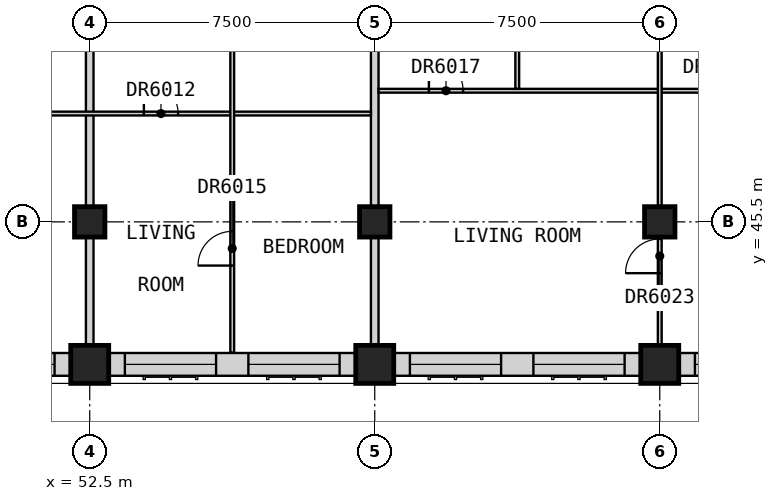
"""IFC4 building model, lengths in metres.
Left out: names, types, materials, properties, quantities, classifications, styles, units other than length and angle.
Written with IfcOpenShell. Run it as: python <this file> out.ifc"""

import sys

from ifc_helpers import new_model, si_unit, direction, frame, frame_2d, origin, origin_2d, place, context, subcontext, project, spatial, rectangle, extrude, element, fill, save


model = new_model("IFC4")
c1 = context("Model", 3, precision=1e-05, world=origin(), true_north=direction((0.0, 1.0)))
c2 = subcontext(c1, "Body", "Model", "MODEL_VIEW")
j1 = project(units=[si_unit("LENGTHUNIT", "METRE"), si_unit("PLANEANGLEUNIT", "RADIAN")], contexts=[c1])
p1 = place(None, origin())
s1 = spatial("IfcSite", under=j1, at=p1, CompositionType="ELEMENT")
p2 = place(p1, origin())
s2 = spatial("IfcBuilding", under=s1, at=p2, CompositionType="ELEMENT")
p3 = place(p2, frame((0.0, 0.0, 254.7)))
s3 = spatial("IfcBuildingStorey", under=s2, at=p3, CompositionType="ELEMENT", Elevation=254.7)
for number, where, z_axis, x_axis in (
    (1, (52.5, 41.75, 0.0), (0.0, 0.0, 1.0), (1.0, 0.0, 0.0)),
    (2, (60.0, 41.75, 0.0), (0.0, 0.0, 1.0), (1.0, 0.0, 0.0)),
    (3, (67.5, 41.75, 0.0), (0.0, 0.0, 1.0), (1.0, 0.0, 0.0)),
):
    element("IfcColumn", number, at=place(p3, frame(where, z_axis=z_axis, x_axis=x_axis)), inside=s3, PredefinedType="COLUMN", context=c2, shape_type="SweptSolid", body=[
        extrude(rectangle(XDim=1.0, YDim=1.0, at=origin_2d()), origin(), (0.0, 0.0, 1.0), 3.5),
    ])
for number, where, z_axis, x_axis in (
    (4, (52.5, 45.5, 0.0), (0.0, 0.0, 1.0), (1.0, 0.0, 0.0)),
    (5, (60.0, 45.5, 0.0), (0.0, 0.0, 1.0), (1.0, 0.0, 0.0)),
    (6, (67.5, 45.5, 0.0), (0.0, 0.0, 1.0), (1.0, 0.0, 0.0)),
):
    element("IfcColumn", number, at=place(p3, frame(where, z_axis=z_axis, x_axis=x_axis)), inside=s3, PredefinedType="COLUMN", context=c2, shape_type="SweptSolid", body=[
        extrude(rectangle(XDim=0.8, YDim=0.8, at=origin_2d()), origin(), (0.0, 0.0, 1.0), 3.5),
    ])
p4 = place(p3, frame((45.5, 41.75, 0.0), z_axis=(0.0, 0.0, 1.0), x_axis=(1.0, 0.0, 0.0)))
e7 = element("IfcWall", 7, at=p4, inside=s3, PredefinedType="SOLIDWALL", context=c2, shape_type="SweptSolid", body=[
    extrude(rectangle(XDim=6.5, YDim=0.6, at=frame_2d((3.25, 0.0))), origin(), (0.0, 0.0, 1.0), 2.75),
])
p5 = place(p4, frame((0.425, 0.0, 0.8)))
e8 = element("IfcOpeningElement", 8, at=p5, cuts=e7, PredefinedType="OPENING", context=c2, shape_type="SweptSolid", body=[
    extrude(rectangle(XDim=2.4, YDim=1.8, at=frame_2d((1.2, 0.9))), frame((0.0, 0.31, 0.0), z_axis=(0.0, -1.0, 0.0), x_axis=(1.0, 0.0, 0.0)), (0.0, 0.0, 1.0), 0.62),
])
p6 = place(p4, frame((3.675, 0.0, 0.8)))
e9 = element("IfcOpeningElement", 9, at=p6, cuts=e7, PredefinedType="OPENING", context=c2, shape_type="SweptSolid", body=[
    extrude(rectangle(XDim=2.4, YDim=1.8, at=frame_2d((1.2, 0.9))), frame((0.0, 0.31, 0.0), z_axis=(0.0, -1.0, 0.0), x_axis=(1.0, 0.0, 0.0)), (0.0, 0.0, 1.0), 0.62),
])
p7 = place(p3, frame((53.0, 41.75, 0.0), z_axis=(0.0, 0.0, 1.0), x_axis=(1.0, 0.0, 0.0)))
e10 = element("IfcWall", 10, at=p7, inside=s3, PredefinedType="SOLIDWALL", context=c2, shape_type="SweptSolid", body=[
    extrude(rectangle(XDim=6.5, YDim=0.6, at=frame_2d((3.25, 0.0))), origin(), (0.0, 0.0, 1.0), 2.75),
])
p8 = place(p7, frame((0.425, 0.0, 0.8)))
e11 = element("IfcOpeningElement", 11, at=p8, cuts=e10, PredefinedType="OPENING", context=c2, shape_type="SweptSolid", body=[
    extrude(rectangle(XDim=2.4, YDim=1.8, at=frame_2d((1.2, 0.9))), frame((0.0, 0.31, 0.0), z_axis=(0.0, -1.0, 0.0), x_axis=(1.0, 0.0, 0.0)), (0.0, 0.0, 1.0), 0.62),
])
p9 = place(p7, frame((3.675, 0.0, 0.8)))
e12 = element("IfcOpeningElement", 12, at=p9, cuts=e10, PredefinedType="OPENING", context=c2, shape_type="SweptSolid", body=[
    extrude(rectangle(XDim=2.4, YDim=1.8, at=frame_2d((1.2, 0.9))), frame((0.0, 0.31, 0.0), z_axis=(0.0, -1.0, 0.0), x_axis=(1.0, 0.0, 0.0)), (0.0, 0.0, 1.0), 0.62),
])
p10 = place(p3, frame((60.5, 41.75, 0.0), z_axis=(0.0, 0.0, 1.0), x_axis=(1.0, 0.0, 0.0)))
e13 = element("IfcWall", 13, at=p10, inside=s3, PredefinedType="SOLIDWALL", context=c2, shape_type="SweptSolid", body=[
    extrude(rectangle(XDim=6.5, YDim=0.6, at=frame_2d((3.25, 0.0))), origin(), (0.0, 0.0, 1.0), 2.75),
])
p11 = place(p10, frame((0.425, 0.0, 0.8)))
e14 = element("IfcOpeningElement", 14, at=p11, cuts=e13, PredefinedType="OPENING", context=c2, shape_type="SweptSolid", body=[
    extrude(rectangle(XDim=2.4, YDim=1.8, at=frame_2d((1.2, 0.9))), frame((0.0, 0.31, 0.0), z_axis=(0.0, -1.0, 0.0), x_axis=(1.0, 0.0, 0.0)), (0.0, 0.0, 1.0), 0.62),
])
p12 = place(p10, frame((3.675, 0.0, 0.8)))
e15 = element("IfcOpeningElement", 15, at=p12, cuts=e13, PredefinedType="OPENING", context=c2, shape_type="SweptSolid", body=[
    extrude(rectangle(XDim=2.4, YDim=1.8, at=frame_2d((1.2, 0.9))), frame((0.0, 0.31, 0.0), z_axis=(0.0, -1.0, 0.0), x_axis=(1.0, 0.0, 0.0)), (0.0, 0.0, 1.0), 0.62),
])
p13 = place(p3, frame((68.0, 41.75, 0.0), z_axis=(0.0, 0.0, 1.0), x_axis=(1.0, 0.0, 0.0)))
e16 = element("IfcWall", 16, at=p13, inside=s3, PredefinedType="SOLIDWALL", context=c2, shape_type="SweptSolid", body=[
    extrude(rectangle(XDim=5.75, YDim=0.6, at=frame_2d((2.875, 0.0))), origin(), (0.0, 0.0, 1.0), 3.1),
])
p14 = place(p13, frame((0.425, 0.0, 0.8)))
e17 = element("IfcOpeningElement", 17, at=p14, cuts=e16, PredefinedType="OPENING", context=c2, shape_type="SweptSolid", body=[
    extrude(rectangle(XDim=2.4, YDim=1.8, at=frame_2d((1.2, 0.9))), frame((0.0, 0.31, 0.0), z_axis=(0.0, -1.0, 0.0), x_axis=(1.0, 0.0, 0.0)), (0.0, 0.0, 1.0), 0.62),
])
for number, where, z_axis, x_axis in (
    (18, (52.5, 41.25, 0.0), (0.0, 0.0, 1.0), (0.0, 1.0, 0.0)),
    (19, (60.0, 41.25, 0.0), (0.0, 0.0, 1.0), (0.0, 1.0, 0.0)),
):
    element("IfcWall", number, at=place(p3, frame(where, z_axis=z_axis, x_axis=x_axis)), inside=s3, PredefinedType="PARTITIONING", context=c2, shape_type="SweptSolid", body=[
        extrude(rectangle(XDim=16.875, YDim=0.2, at=frame_2d((8.438, 0.0))), origin(), (0.0, 0.0, 1.0), 3.1),
    ])
p15 = place(p3, frame((37.6, 48.35, 0.0), z_axis=(0.0, 0.0, 1.0), x_axis=(1.0, 0.0, 0.0)))
e20 = element("IfcWall", 20, at=p15, inside=s3, PredefinedType="PARTITIONING", context=c2, shape_type="SweptSolid", body=[
    extrude(rectangle(XDim=22.3, YDim=0.1, at=frame_2d((11.15, 0.0))), origin(), (0.0, 0.0, 1.0), 3.1),
])
p16 = place(p15, frame((1.325, 0.0, 0.0)))
e21 = element("IfcOpeningElement", 21, at=p16, cuts=e20, PredefinedType="OPENING", context=c2, shape_type="SweptSolid", body=[
    extrude(rectangle(XDim=0.9, YDim=2.1, at=frame_2d((0.45, 1.05))), frame((0.0, 0.06, 0.0), z_axis=(0.0, -1.0, 0.0), x_axis=(1.0, 0.0, 0.0)), (0.0, 0.0, 1.0), 0.12),
])
p17 = place(p15, frame((8.825, 0.0, 0.0)))
e22 = element("IfcOpeningElement", 22, at=p17, cuts=e20, PredefinedType="OPENING", context=c2, shape_type="SweptSolid", body=[
    extrude(rectangle(XDim=0.9, YDim=2.1, at=frame_2d((0.45, 1.05))), frame((0.0, 0.06, 0.0), z_axis=(0.0, -1.0, 0.0), x_axis=(1.0, 0.0, 0.0)), (0.0, 0.0, 1.0), 0.12),
])
p18 = place(p15, frame((16.325, 0.0, 0.0)))
e23 = element("IfcOpeningElement", 23, at=p18, cuts=e20, PredefinedType="OPENING", context=c2, shape_type="SweptSolid", body=[
    extrude(rectangle(XDim=0.9, YDim=2.1, at=frame_2d((0.45, 1.05))), frame((0.0, 0.06, 0.0), z_axis=(0.0, -1.0, 0.0), x_axis=(1.0, 0.0, 0.0)), (0.0, 0.0, 1.0), 0.12),
])
p19 = place(p3, frame((60.1, 48.95, 0.0), z_axis=(0.0, 0.0, 1.0), x_axis=(1.0, 0.0, 0.0)))
e24 = element("IfcWall", 24, at=p19, inside=s3, PredefinedType="PARTITIONING", context=c2, shape_type="SweptSolid", body=[
    extrude(rectangle(XDim=17.84, YDim=0.1, at=frame_2d((8.92, 0.0))), origin(), (0.0, 0.0, 1.0), 3.1),
])
p20 = place(p19, frame((1.325, 0.0, 0.0)))
e25 = element("IfcOpeningElement", 25, at=p20, cuts=e24, PredefinedType="OPENING", context=c2, shape_type="SweptSolid", body=[
    extrude(rectangle(XDim=0.9, YDim=2.1, at=frame_2d((0.45, 1.05))), frame((0.0, 0.06, 0.0), z_axis=(0.0, -1.0, 0.0), x_axis=(1.0, 0.0, 0.0)), (0.0, 0.0, 1.0), 0.12),
])
p21 = place(p19, frame((8.475, 0.0, 0.0)))
e26 = element("IfcOpeningElement", 26, at=p21, cuts=e24, PredefinedType="OPENING", context=c2, shape_type="SweptSolid", body=[
    extrude(rectangle(XDim=0.9, YDim=2.1, at=frame_2d((0.45, 1.05))), frame((0.0, 0.06, 0.0), z_axis=(0.0, -1.0, 0.0), x_axis=(1.0, 0.0, 0.0)), (0.0, 0.0, 1.0), 0.12),
])
p22 = place(p19, frame((13.725, 0.0, 0.0)))
e27 = element("IfcOpeningElement", 27, at=p22, cuts=e24, PredefinedType="OPENING", context=c2, shape_type="SweptSolid", body=[
    extrude(rectangle(XDim=0.9, YDim=2.1, at=frame_2d((0.45, 1.05))), frame((0.0, 0.06, 0.0), z_axis=(0.0, -1.0, 0.0), x_axis=(1.0, 0.0, 0.0)), (0.0, 0.0, 1.0), 0.12),
])
p23 = place(p19, frame((16.325, 0.0, 0.0)))
e28 = element("IfcOpeningElement", 28, at=p23, cuts=e24, PredefinedType="OPENING", context=c2, shape_type="SweptSolid", body=[
    extrude(rectangle(XDim=0.9, YDim=2.1, at=frame_2d((0.45, 1.05))), frame((0.0, 0.06, 0.0), z_axis=(0.0, -1.0, 0.0), x_axis=(1.0, 0.0, 0.0)), (0.0, 0.0, 1.0), 0.12),
])
p24 = place(p3, frame((56.25, 42.06, 0.0), z_axis=(0.0, 0.0, 1.0), x_axis=(0.0, 1.0, 0.0)))
e29 = element("IfcWall", 29, at=p24, inside=s3, PredefinedType="PARTITIONING", context=c2, shape_type="SweptSolid", body=[
    extrude(rectangle(XDim=11.152, YDim=0.1, at=frame_2d((5.576, 0.0))), origin(), (0.0, 0.0, 1.0), 3.1),
])
p25 = place(p24, frame((8.302, 0.0, 0.0)))
e30 = element("IfcOpeningElement", 30, at=p25, cuts=e29, PredefinedType="OPENING", context=c2, shape_type="SweptSolid", body=[
    extrude(rectangle(XDim=0.9, YDim=2.1, at=frame_2d((0.45, 1.05))), frame((0.0, 0.06, 0.0), z_axis=(0.0, -1.0, 0.0), x_axis=(1.0, 0.0, 0.0)), (0.0, 0.0, 1.0), 0.12),
])
p26 = place(p24, frame((2.29, 0.0, 0.0)))
e31 = element("IfcOpeningElement", 31, at=p26, cuts=e29, PredefinedType="OPENING", context=c2, shape_type="SweptSolid", body=[
    extrude(rectangle(XDim=0.9, YDim=2.1, at=frame_2d((0.45, 1.05))), frame((0.0, 0.06, 0.0), z_axis=(0.0, -1.0, 0.0), x_axis=(1.0, 0.0, 0.0)), (0.0, 0.0, 1.0), 0.12),
])
p27 = place(p3, frame((63.75, 49.0, 0.0), z_axis=(0.0, 0.0, 1.0), x_axis=(0.0, 1.0, 0.0)))
e32 = element("IfcWall", 32, at=p27, inside=s3, PredefinedType="PARTITIONING", context=c2, shape_type="SweptSolid", body=[
    extrude(rectangle(XDim=5.413, YDim=0.1, at=frame_2d((2.706, 0.0))), origin(), (0.0, 0.0, 1.0), 3.1),
])
p28 = place(p27, frame((2.262, 0.0, 0.0)))
e33 = element("IfcOpeningElement", 33, at=p28, cuts=e32, PredefinedType="OPENING", context=c2, shape_type="SweptSolid", body=[
    extrude(rectangle(XDim=0.9, YDim=2.1, at=frame_2d((0.45, 1.05))), frame((0.0, 0.06, 0.0), z_axis=(0.0, -1.0, 0.0), x_axis=(1.0, 0.0, 0.0)), (0.0, 0.0, 1.0), 0.12),
])
p29 = place(p3, frame((67.5, 41.25, 0.0), z_axis=(0.0, 0.0, 1.0), x_axis=(0.0, 1.0, 0.0)))
e34 = element("IfcWall", 34, at=p29, inside=s3, PredefinedType="PARTITIONING", context=c2, shape_type="SweptSolid", body=[
    extrude(rectangle(XDim=13.163, YDim=0.1, at=frame_2d((6.581, 0.0))), origin(), (0.0, 0.0, 1.0), 3.1),
])
p30 = place(p29, frame((2.9, 0.0, 0.0)))
e35 = element("IfcOpeningElement", 35, at=p30, cuts=e34, PredefinedType="OPENING", context=c2, shape_type="SweptSolid", body=[
    extrude(rectangle(XDim=0.9, YDim=2.1, at=frame_2d((0.45, 1.05))), frame((0.0, 0.06, 0.0), z_axis=(0.0, -1.0, 0.0), x_axis=(1.0, 0.0, 0.0)), (0.0, 0.0, 1.0), 0.12),
])
p31 = place(p6, origin())
e36 = element("IfcWindow", 36, at=p31, inside=s3, PartitioningType="SINGLE_PANEL", PredefinedType="WINDOW", context=c2, shape_type="SweptSolid", body=[
    extrude(rectangle(XDim=2.4, YDim=1.8, at=frame_2d((1.2, 0.9))), frame((0.0, -0.07, 0.0), z_axis=(0.0, -1.0, 0.0), x_axis=(1.0, 0.0, 0.0)), (0.0, 0.0, 1.0), 0.06),
])
fill(e9, e36)
p32 = place(p8, origin())
e37 = element("IfcWindow", 37, at=p32, inside=s3, PartitioningType="SINGLE_PANEL", PredefinedType="WINDOW", context=c2, shape_type="SweptSolid", body=[
    extrude(rectangle(XDim=2.4, YDim=1.8, at=frame_2d((1.2, 0.9))), frame((0.0, -0.07, 0.0), z_axis=(0.0, -1.0, 0.0), x_axis=(1.0, 0.0, 0.0)), (0.0, 0.0, 1.0), 0.06),
])
fill(e11, e37)
p33 = place(p9, origin())
e38 = element("IfcWindow", 38, at=p33, inside=s3, PartitioningType="SINGLE_PANEL", PredefinedType="WINDOW", context=c2, shape_type="SweptSolid", body=[
    extrude(rectangle(XDim=2.4, YDim=1.8, at=frame_2d((1.2, 0.9))), frame((0.0, -0.07, 0.0), z_axis=(0.0, -1.0, 0.0), x_axis=(1.0, 0.0, 0.0)), (0.0, 0.0, 1.0), 0.06),
])
fill(e12, e38)
p34 = place(p11, origin())
e39 = element("IfcWindow", 39, at=p34, inside=s3, PartitioningType="SINGLE_PANEL", PredefinedType="WINDOW", context=c2, shape_type="SweptSolid", body=[
    extrude(rectangle(XDim=2.4, YDim=1.8, at=frame_2d((1.2, 0.9))), frame((0.0, -0.07, 0.0), z_axis=(0.0, -1.0, 0.0), x_axis=(1.0, 0.0, 0.0)), (0.0, 0.0, 1.0), 0.06),
])
fill(e14, e39)
p35 = place(p12, origin())
e40 = element("IfcWindow", 40, at=p35, inside=s3, PartitioningType="SINGLE_PANEL", PredefinedType="WINDOW", context=c2, shape_type="SweptSolid", body=[
    extrude(rectangle(XDim=2.4, YDim=1.8, at=frame_2d((1.2, 0.9))), frame((0.0, -0.07, 0.0), z_axis=(0.0, -1.0, 0.0), x_axis=(1.0, 0.0, 0.0)), (0.0, 0.0, 1.0), 0.06),
])
fill(e15, e40)
p36 = place(p14, origin())
e41 = element("IfcWindow", 41, at=p36, inside=s3, PartitioningType="SINGLE_PANEL", PredefinedType="WINDOW", context=c2, shape_type="SweptSolid", body=[
    extrude(rectangle(XDim=2.4, YDim=1.8, at=frame_2d((1.2, 0.9))), frame((0.0, -0.07, 0.0), z_axis=(0.0, -1.0, 0.0), x_axis=(1.0, 0.0, 0.0)), (0.0, 0.0, 1.0), 0.06),
])
fill(e17, e41)
p37 = place(p18, origin())
e42 = element("IfcDoor", 42, at=p37, inside=s3, OperationType="SINGLE_SWING_LEFT", PredefinedType="DOOR", context=c2, shape_type="SweptSolid", body=[
    extrude(rectangle(XDim=0.9, YDim=2.1, at=frame_2d((0.45, 1.05))), frame((0.0, 0.025, 0.0), z_axis=(0.0, -1.0, 0.0), x_axis=(1.0, 0.0, 0.0)), (0.0, 0.0, 1.0), 0.05),
])
fill(e23, e42)
p38 = place(p26, origin())
e43 = element("IfcDoor", 43, at=p38, inside=s3, OperationType="SINGLE_SWING_LEFT", PredefinedType="DOOR", context=c2, shape_type="SweptSolid", body=[
    extrude(rectangle(XDim=0.9, YDim=2.1, at=frame_2d((0.45, 1.05))), frame((0.0, 0.025, 0.0), z_axis=(0.0, -1.0, 0.0), x_axis=(1.0, 0.0, 0.0)), (0.0, 0.0, 1.0), 0.05),
])
fill(e31, e43)
p39 = place(p20, origin())
e44 = element("IfcDoor", 44, at=p39, inside=s3, OperationType="SINGLE_SWING_LEFT", PredefinedType="DOOR", context=c2, shape_type="SweptSolid", body=[
    extrude(rectangle(XDim=0.9, YDim=2.1, at=frame_2d((0.45, 1.05))), frame((0.0, 0.025, 0.0), z_axis=(0.0, -1.0, 0.0), x_axis=(1.0, 0.0, 0.0)), (0.0, 0.0, 1.0), 0.05),
])
fill(e25, e44)
p40 = place(p30, origin())
e45 = element("IfcDoor", 45, at=p40, inside=s3, OperationType="SINGLE_SWING_LEFT", PredefinedType="DOOR", context=c2, shape_type="SweptSolid", body=[
    extrude(rectangle(XDim=0.9, YDim=2.1, at=frame_2d((0.45, 1.05))), frame((0.0, 0.025, 0.0), z_axis=(0.0, -1.0, 0.0), x_axis=(1.0, 0.0, 0.0)), (0.0, 0.0, 1.0), 0.05),
])
fill(e35, e45)
save(model, sys.argv[1])
